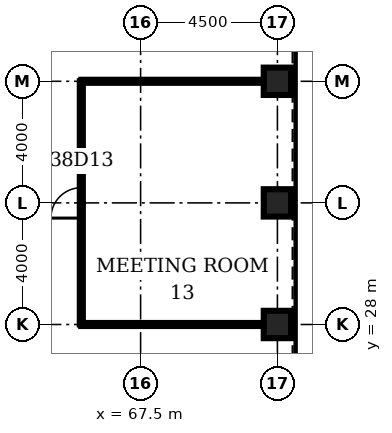
"""IFC4 building model, lengths in metres.
Left out: names, types, materials, properties, quantities, classifications, styles, units other than length and angle.
Written with IfcOpenShell. Run it as: python <this file> out.ifc"""

import sys

from ifc_helpers import new_model, si_unit, direction, frame, frame_2d, origin, origin_2d, place, context, subcontext, project, spatial, rectangle, hollow_rectangle, extrude, element, fill, save


model = new_model("IFC4")
c1 = context("Model", 3, precision=1e-05, world=origin(), true_north=direction((0.0, 1.0)))
c2 = subcontext(c1, "Body", "Model", "MODEL_VIEW")
j1 = project(units=[si_unit("LENGTHUNIT", "METRE"), si_unit("PLANEANGLEUNIT", "RADIAN")], contexts=[c1])
p1 = place(None, origin())
s1 = spatial("IfcSite", under=j1, at=p1, CompositionType="ELEMENT")
p2 = place(p1, origin())
s2 = spatial("IfcBuilding", under=s1, at=p2, CompositionType="ELEMENT")
p3 = place(p2, frame((0.0, 0.0, 171.9)))
s3 = spatial("IfcBuildingStorey", under=s2, at=p3, CompositionType="ELEMENT", Elevation=171.9)
for number, where, z_axis, x_axis in (
    (1, (72.0, 28.0, 0.0), (0.0, 0.0, 1.0), (1.0, 0.0, 0.0)),
    (2, (72.0, 32.0, 0.0), (0.0, 0.0, 1.0), (1.0, 0.0, 0.0)),
    (3, (72.0, 36.0, 0.0), (0.0, 0.0, 1.0), (1.0, 0.0, 0.0)),
):
    element("IfcColumn", number, at=place(p3, frame(where, z_axis=z_axis, x_axis=x_axis)), inside=s3, PredefinedType="COLUMN", context=c2, shape_type="SweptSolid", body=[
        extrude(hollow_rectangle(XDim=0.9, YDim=0.9, WallThickness=0.09, at=origin_2d()), origin(), (0.0, 0.0, 1.0), 4.2),
    ])
for number, where, z_axis, x_axis in (
    (4, (65.55, 28.0, 0.0), (0.0, 0.0, 1.0), (1.0, 0.0, 0.0)),
    (5, (65.55, 36.0, 0.0), (0.0, 0.0, 1.0), (1.0, 0.0, 0.0)),
):
    element("IfcWall", number, at=place(p3, frame(where, z_axis=z_axis, x_axis=x_axis)), inside=s3, PredefinedType="PARTITIONING", context=c2, shape_type="SweptSolid", body=[
        extrude(rectangle(XDim=6.0, YDim=0.1, at=frame_2d((3.0, 0.0))), origin(), (0.0, 0.0, 1.0), 3.0),
    ])
p4 = place(p3, frame((65.55, 28.0, 0.0), z_axis=(0.0, 0.0, 1.0), x_axis=(0.0, 1.0, 0.0)))
e6 = element("IfcWall", 6, at=p4, inside=s3, PredefinedType="PARTITIONING", context=c2, shape_type="SweptSolid", body=[
    extrude(rectangle(XDim=8.0, YDim=0.1, at=frame_2d((4.0, 0.0))), origin(), (0.0, 0.0, 1.0), 3.0),
])
p5 = place(p4, frame((3.5, 0.0, 0.0)))
e7 = element("IfcOpeningElement", 7, at=p5, cuts=e6, PredefinedType="OPENING", context=c2, shape_type="SweptSolid", body=[
    extrude(rectangle(XDim=1.0, YDim=2.1, at=frame_2d((0.5, 1.05))), frame((0.0, 0.06, 0.0), z_axis=(0.0, -1.0, 0.0), x_axis=(1.0, 0.0, 0.0)), (0.0, 0.0, 1.0), 0.12),
])
p6 = place(p5, origin())
e8 = element("IfcDoor", 8, at=p6, inside=s3, OperationType="SINGLE_SWING_LEFT", PredefinedType="DOOR", context=c2, shape_type="SweptSolid", body=[
    extrude(rectangle(XDim=1.0, YDim=2.1, at=frame_2d((0.5, 1.05))), frame((0.0, 0.025, 0.0), z_axis=(0.0, -1.0, 0.0), x_axis=(1.0, 0.0, 0.0)), (0.0, 0.0, 1.0), 0.05),
])
fill(e7, e8)
save(model, sys.argv[1])
